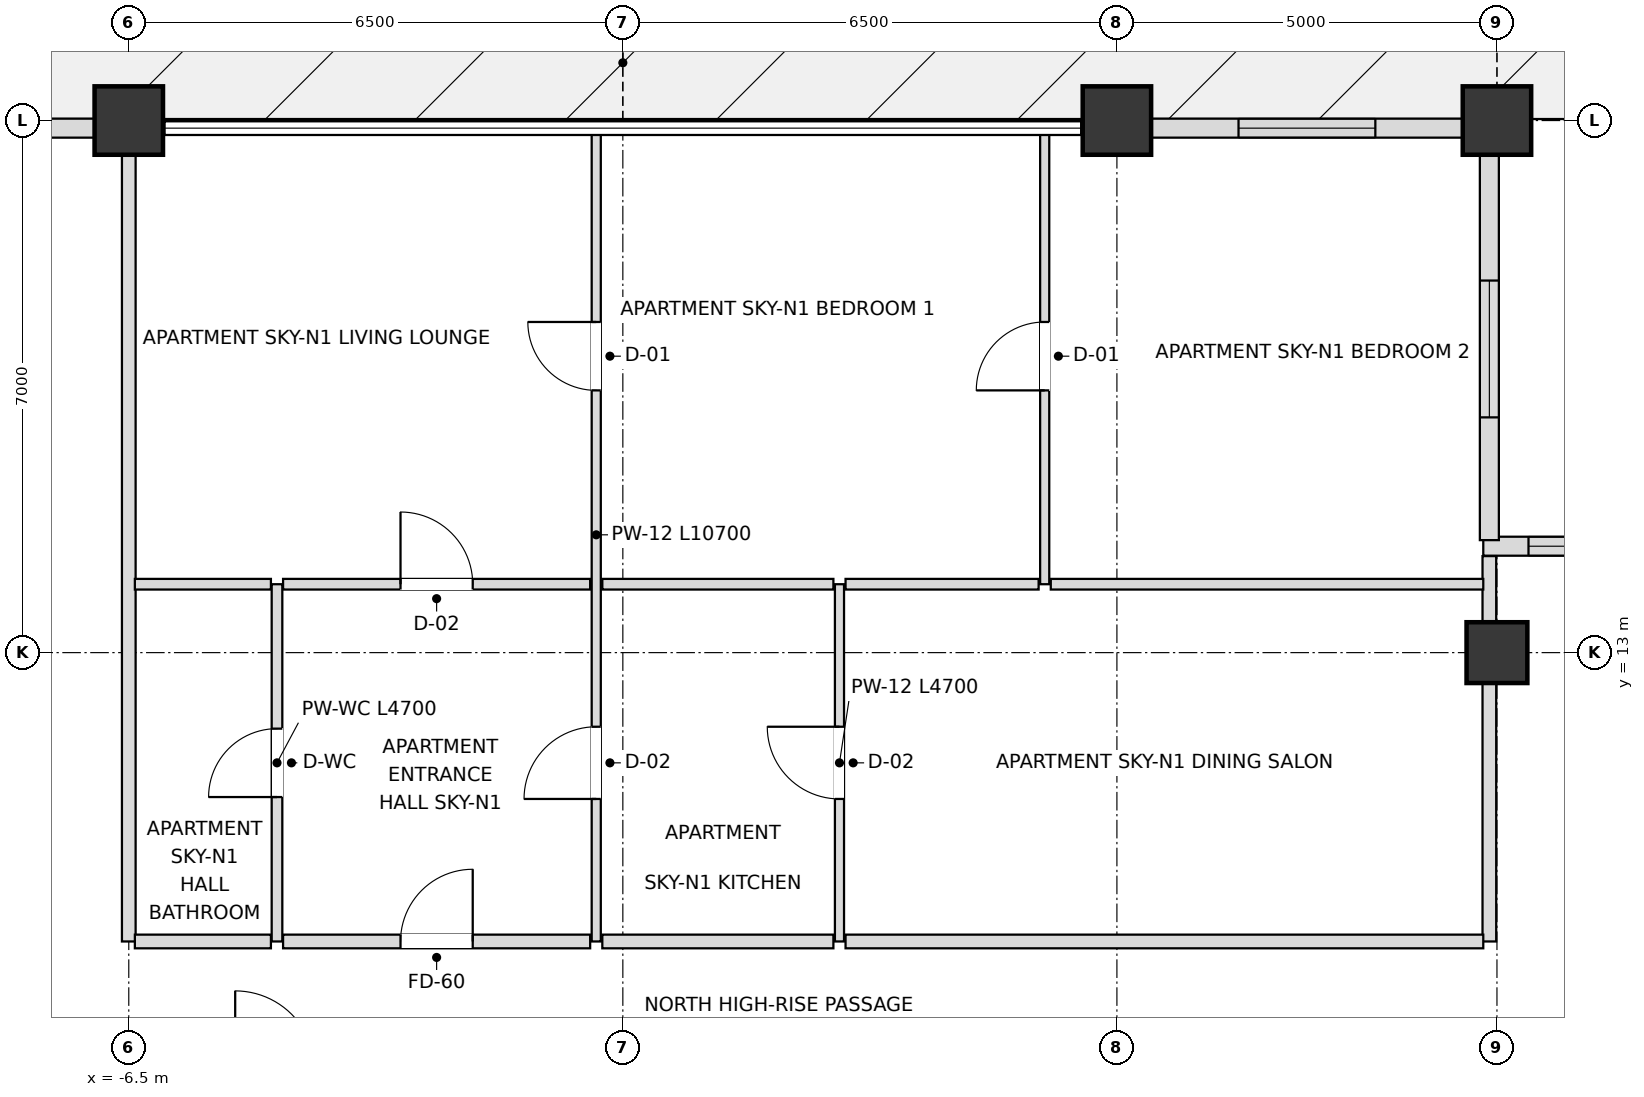
"""IFC4 building model, lengths in metres.
Left out: names, types, materials, properties, quantities, classifications, styles, units other than length and angle.
Written with IfcOpenShell. Run it as: python <this file> out.ifc"""

import sys

from ifc_helpers import new_model, si_unit, direction, frame, frame_2d, origin, origin_2d, place, context, subcontext, project, spatial, rectangle, extrude, element, fill, save


model = new_model("IFC4")
c1 = context("Model", 3, precision=1e-05, world=origin(), true_north=direction((0.0, 1.0)))
c2 = subcontext(c1, "Body", "Model", "MODEL_VIEW")
j1 = project(units=[si_unit("LENGTHUNIT", "METRE"), si_unit("PLANEANGLEUNIT", "RADIAN")], contexts=[c1])
p1 = place(None, origin())
s1 = spatial("IfcSite", under=j1, at=p1, CompositionType="ELEMENT")
p2 = place(p1, origin())
s2 = spatial("IfcBuilding", under=s1, at=p2, CompositionType="ELEMENT")
p3 = place(p2, frame((0.0, 0.0, 217.8)))
s3 = spatial("IfcBuildingStorey", under=s2, at=p3, CompositionType="ELEMENT", Elevation=217.8)
for number, where, z_axis, x_axis in (
    (1, (11.5, 20.0, 0.0), (0.0, 0.0, 1.0), (1.0, 0.0, 0.0)),
    (2, (6.5, 20.0, 0.0), (0.0, 0.0, 1.0), (1.0, 0.0, 0.0)),
    (3, (-6.5, 20.0, 0.0), (0.0, 0.0, 1.0), (1.0, 0.0, 0.0)),
):
    element("IfcColumn", number, at=place(p3, frame(where, z_axis=z_axis, x_axis=x_axis)), inside=s3, PredefinedType="USERDEFINED", context=c2, shape_type="SweptSolid", body=[
        extrude(rectangle(XDim=0.9, YDim=0.9, at=origin_2d()), origin(), (0.0, 0.0, 1.0), 4.5),
    ])
p4 = place(p3, frame((11.5, 13.0, 0.0), z_axis=(0.0, 0.0, 1.0), x_axis=(1.0, 0.0, 0.0)))
e4 = element("IfcColumn", 4, at=p4, inside=s3, PredefinedType="COLUMN", context=c2, shape_type="SweptSolid", body=[
    extrude(rectangle(XDim=0.8, YDim=0.8, at=origin_2d()), origin(), (0.0, 0.0, 1.0), 4.5),
])
p5 = place(p3, frame((11.055, 19.9, 0.0), z_axis=(0.0, 0.0, 1.0), x_axis=(-1.0, 0.0, 0.0)))
e5 = element("IfcWall", 5, at=p5, inside=s3, PredefinedType="SOLIDWALL", context=c2, shape_type="SweptSolid", body=[
    extrude(rectangle(XDim=4.11, YDim=0.25, at=frame_2d((2.055, 0.0))), origin(), (0.0, 0.0, 1.0), 3.648),
])
p6 = place(p5, frame((1.155, 0.0, 0.72)))
e6 = element("IfcOpeningElement", 6, at=p6, cuts=e5, PredefinedType="OPENING", context=c2, shape_type="SweptSolid", body=[
    extrude(rectangle(XDim=1.8, YDim=1.68, at=frame_2d((0.9, 0.84))), frame((0.0, 0.135, 0.0), z_axis=(0.0, -1.0, 0.0), x_axis=(1.0, 0.0, 0.0)), (0.0, 0.0, 1.0), 0.27),
])
p7 = place(p3, frame((-6.945, 19.9, 0.0), z_axis=(0.0, 0.0, 1.0), x_axis=(-1.0, 0.0, 0.0)))
e7 = element("IfcWall", 7, at=p7, inside=s3, PredefinedType="SOLIDWALL", context=c2, shape_type="SweptSolid", body=[
    extrude(rectangle(XDim=4.11, YDim=0.25, at=frame_2d((2.055, 0.0))), origin(), (0.0, 0.0, 1.0), 3.648),
])
p8 = place(p7, frame((1.155, 0.0, 0.72)))
e8 = element("IfcOpeningElement", 8, at=p8, cuts=e7, PredefinedType="OPENING", context=c2, shape_type="SweptSolid", body=[
    extrude(rectangle(XDim=1.8, YDim=1.68, at=frame_2d((0.9, 0.84))), frame((0.0, 0.135, 0.0), z_axis=(0.0, -1.0, 0.0), x_axis=(1.0, 0.0, 0.0)), (0.0, 0.0, 1.0), 0.27),
])
p9 = place(p3, frame((16.98, 14.4, 0.0), z_axis=(0.0, 0.0, 1.0), x_axis=(-1.0, 0.0, 0.0)))
e9 = element("IfcWall", 9, at=p9, inside=s3, PredefinedType="SOLIDWALL", context=c2, shape_type="SweptSolid", body=[
    extrude(rectangle(XDim=5.66, YDim=0.25, at=frame_2d((2.83, 0.0))), origin(), (0.0, 0.0, 1.0), 3.648),
])
p10 = place(p9, frame((0.595, 0.0, 0.72)))
e10 = element("IfcOpeningElement", 10, at=p10, cuts=e9, PredefinedType="OPENING", context=c2, shape_type="SweptSolid", body=[
    extrude(rectangle(XDim=1.8, YDim=1.68, at=frame_2d((0.9, 0.84))), frame((0.0, 0.135, 0.0), z_axis=(0.0, -1.0, 0.0), x_axis=(1.0, 0.0, 0.0)), (0.0, 0.0, 1.0), 0.27),
])
p11 = place(p9, frame((3.265, 0.0, 0.72)))
e11 = element("IfcOpeningElement", 11, at=p11, cuts=e9, PredefinedType="OPENING", context=c2, shape_type="SweptSolid", body=[
    extrude(rectangle(XDim=1.8, YDim=1.68, at=frame_2d((0.9, 0.84))), frame((0.0, 0.135, 0.0), z_axis=(0.0, -1.0, 0.0), x_axis=(1.0, 0.0, 0.0)), (0.0, 0.0, 1.0), 0.27),
])
p12 = place(p3, frame((11.4, 14.48, 0.0), z_axis=(0.0, 0.0, 1.0), x_axis=(0.0, 1.0, 0.0)))
e12 = element("IfcWall", 12, at=p12, inside=s3, PredefinedType="SOLIDWALL", context=c2, shape_type="SweptSolid", body=[
    extrude(rectangle(XDim=5.34, YDim=0.25, at=frame_2d((2.67, 0.0))), origin(), (0.0, 0.0, 1.0), 3.648),
])
p13 = place(p12, frame((1.615, 0.0, 0.72)))
e13 = element("IfcOpeningElement", 13, at=p13, cuts=e12, PredefinedType="OPENING", context=c2, shape_type="SweptSolid", body=[
    extrude(rectangle(XDim=1.8, YDim=1.68, at=frame_2d((0.9, 0.84))), frame((0.0, 0.135, 0.0), z_axis=(0.0, -1.0, 0.0), x_axis=(1.0, 0.0, 0.0)), (0.0, 0.0, 1.0), 0.27),
])
p14 = place(p3, frame((-6.5, 9.2, 0.0), z_axis=(0.0, 0.0, 1.0), x_axis=(0.0, 1.0, 0.0)))
e14 = element("IfcWall", 14, at=p14, inside=s3, PredefinedType="PARTITIONING", context=c2, shape_type="SweptSolid", body=[
    extrude(rectangle(XDim=10.7, YDim=0.18, at=frame_2d((5.35, 0.0))), origin(), (0.0, 0.0, 1.0), 3.726),
])
p15 = place(p3, frame((-4.55, 9.2, 0.0), z_axis=(0.0, 0.0, 1.0), x_axis=(0.0, 1.0, 0.0)))
e15 = element("IfcWall", 15, at=p15, inside=s3, PredefinedType="PARTITIONING", context=c2, shape_type="SweptSolid", body=[
    extrude(rectangle(XDim=4.7, YDim=0.14, at=frame_2d((2.35, 0.0))), origin(), (0.0, 0.0, 1.0), 4.28),
])
p16 = place(p15, frame((1.9, 0.0, 0.0)))
e16 = element("IfcOpeningElement", 16, at=p16, cuts=e15, PredefinedType="OPENING", context=c2, shape_type="SweptSolid", body=[
    extrude(rectangle(XDim=0.9, YDim=2.1, at=frame_2d((0.45, 1.05))), frame((0.0, 0.08, 0.0), z_axis=(0.0, -1.0, 0.0), x_axis=(1.0, 0.0, 0.0)), (0.0, 0.0, 1.0), 0.16),
])
p17 = place(p3, frame((-0.35, 9.2, 0.0), z_axis=(0.0, 0.0, 1.0), x_axis=(0.0, 1.0, 0.0)))
e17 = element("IfcWall", 17, at=p17, inside=s3, PredefinedType="PARTITIONING", context=c2, shape_type="SweptSolid", body=[
    extrude(rectangle(XDim=10.7, YDim=0.12, at=frame_2d((5.35, 0.0))), origin(), (0.0, 0.0, 1.0), 3.918),
])
p18 = place(p17, frame((1.875, 0.0, 0.0)))
e18 = element("IfcOpeningElement", 18, at=p18, cuts=e17, PredefinedType="OPENING", context=c2, shape_type="SweptSolid", body=[
    extrude(rectangle(XDim=0.95, YDim=2.1, at=frame_2d((0.475, 1.05))), frame((0.0, 0.07, 0.0), z_axis=(0.0, -1.0, 0.0), x_axis=(1.0, 0.0, 0.0)), (0.0, 0.0, 1.0), 0.14),
])
p19 = place(p17, frame((7.25, 0.0, 0.0)))
e19 = element("IfcOpeningElement", 19, at=p19, cuts=e17, PredefinedType="OPENING", context=c2, shape_type="SweptSolid", body=[
    extrude(rectangle(XDim=0.9, YDim=2.1, at=frame_2d((0.45, 1.05))), frame((0.0, 0.07, 0.0), z_axis=(0.0, -1.0, 0.0), x_axis=(1.0, 0.0, 0.0)), (0.0, 0.0, 1.0), 0.14),
])
p20 = place(p3, frame((2.85, 9.2, 0.0), z_axis=(0.0, 0.0, 1.0), x_axis=(0.0, 1.0, 0.0)))
e20 = element("IfcWall", 20, at=p20, inside=s3, PredefinedType="PARTITIONING", context=c2, shape_type="SweptSolid", body=[
    extrude(rectangle(XDim=4.7, YDim=0.12, at=frame_2d((2.35, 0.0))), origin(), (0.0, 0.0, 1.0), 4.28),
])
p21 = place(p20, frame((1.875, 0.0, 0.0)))
e21 = element("IfcOpeningElement", 21, at=p21, cuts=e20, PredefinedType="OPENING", context=c2, shape_type="SweptSolid", body=[
    extrude(rectangle(XDim=0.95, YDim=2.1, at=frame_2d((0.475, 1.05))), frame((0.0, 0.07, 0.0), z_axis=(0.0, -1.0, 0.0), x_axis=(1.0, 0.0, 0.0)), (0.0, 0.0, 1.0), 0.14),
])
p22 = place(p3, frame((5.55, 13.9, 0.0), z_axis=(0.0, 0.0, 1.0), x_axis=(0.0, 1.0, 0.0)))
e22 = element("IfcWall", 22, at=p22, inside=s3, PredefinedType="PARTITIONING", context=c2, shape_type="SweptSolid", body=[
    extrude(rectangle(XDim=6.0, YDim=0.12, at=frame_2d((3.0, 0.0))), origin(), (0.0, 0.0, 1.0), 3.918),
])
p23 = place(p22, frame((2.55, 0.0, 0.0)))
e23 = element("IfcOpeningElement", 23, at=p23, cuts=e22, PredefinedType="OPENING", context=c2, shape_type="SweptSolid", body=[
    extrude(rectangle(XDim=0.9, YDim=2.1, at=frame_2d((0.45, 1.05))), frame((0.0, 0.07, 0.0), z_axis=(0.0, -1.0, 0.0), x_axis=(1.0, 0.0, 0.0)), (0.0, 0.0, 1.0), 0.14),
])
p24 = place(p3, frame((11.4, 9.2, 0.0), z_axis=(0.0, 0.0, 1.0), x_axis=(0.0, 1.0, 0.0)))
e24 = element("IfcWall", 24, at=p24, inside=s3, PredefinedType="PARTITIONING", context=c2, shape_type="SweptSolid", body=[
    extrude(rectangle(XDim=5.07, YDim=0.18, at=frame_2d((2.535, 0.0))), origin(), (0.0, 0.0, 1.0), 3.648),
])
p25 = place(p3, frame((-6.42, 9.2, 0.0), z_axis=(0.0, 0.0, 1.0), x_axis=(1.0, 0.0, 0.0)))
e25 = element("IfcWall", 25, at=p25, inside=s3, PredefinedType="PARTITIONING", context=c2, shape_type="SweptSolid", body=[
    extrude(rectangle(XDim=1.79, YDim=0.18, at=frame_2d((0.895, 0.0))), origin(), (0.0, 0.0, 1.0), 4.28),
])
p26 = place(p3, frame((-4.47, 9.2, 0.0), z_axis=(0.0, 0.0, 1.0), x_axis=(1.0, 0.0, 0.0)))
e26 = element("IfcWall", 26, at=p26, inside=s3, PredefinedType="PARTITIONING", context=c2, shape_type="SweptSolid", body=[
    extrude(rectangle(XDim=4.04, YDim=0.18, at=frame_2d((2.02, 0.0))), origin(), (0.0, 0.0, 1.0), 4.28),
])
p27 = place(p26, frame((1.545, 0.0, 0.0)))
e27 = element("IfcOpeningElement", 27, at=p27, cuts=e26, PredefinedType="OPENING", context=c2, shape_type="SweptSolid", body=[
    extrude(rectangle(XDim=0.95, YDim=2.15, at=frame_2d((0.475, 1.075))), frame((0.0, 0.1, 0.0), z_axis=(0.0, -1.0, 0.0), x_axis=(1.0, 0.0, 0.0)), (0.0, 0.0, 1.0), 0.2),
])
p28 = place(p3, frame((-0.27, 9.2, 0.0), z_axis=(0.0, 0.0, 1.0), x_axis=(1.0, 0.0, 0.0)))
e28 = element("IfcWall", 28, at=p28, inside=s3, PredefinedType="PARTITIONING", context=c2, shape_type="SweptSolid", body=[
    extrude(rectangle(XDim=3.04, YDim=0.18, at=frame_2d((1.52, 0.0))), origin(), (0.0, 0.0, 1.0), 4.28),
])
p29 = place(p3, frame((2.93, 9.2, 0.0), z_axis=(0.0, 0.0, 1.0), x_axis=(1.0, 0.0, 0.0)))
e29 = element("IfcWall", 29, at=p29, inside=s3, PredefinedType="PARTITIONING", context=c2, shape_type="SweptSolid", body=[
    extrude(rectangle(XDim=8.39, YDim=0.18, at=frame_2d((4.195, 0.0))), origin(), (0.0, 0.0, 1.0), 3.726),
])
p30 = place(p3, frame((-6.42, 13.9, 0.0), z_axis=(0.0, 0.0, 1.0), x_axis=(1.0, 0.0, 0.0)))
e30 = element("IfcWall", 30, at=p30, inside=s3, PredefinedType="PARTITIONING", context=c2, shape_type="SweptSolid", body=[
    extrude(rectangle(XDim=1.79, YDim=0.14, at=frame_2d((0.895, 0.0))), origin(), (0.0, 0.0, 1.0), 4.28),
])
p31 = place(p3, frame((-4.47, 13.9, 0.0), z_axis=(0.0, 0.0, 1.0), x_axis=(1.0, 0.0, 0.0)))
e31 = element("IfcWall", 31, at=p31, inside=s3, PredefinedType="PARTITIONING", context=c2, shape_type="SweptSolid", body=[
    extrude(rectangle(XDim=4.04, YDim=0.14, at=frame_2d((2.02, 0.0))), origin(), (0.0, 0.0, 1.0), 4.28),
])
p32 = place(p31, frame((1.545, 0.0, 0.0)))
e32 = element("IfcOpeningElement", 32, at=p32, cuts=e31, PredefinedType="OPENING", context=c2, shape_type="SweptSolid", body=[
    extrude(rectangle(XDim=0.95, YDim=2.1, at=frame_2d((0.475, 1.05))), frame((0.0, 0.08, 0.0), z_axis=(0.0, -1.0, 0.0), x_axis=(1.0, 0.0, 0.0)), (0.0, 0.0, 1.0), 0.16),
])
p33 = place(p3, frame((-0.27, 13.9, 0.0), z_axis=(0.0, 0.0, 1.0), x_axis=(1.0, 0.0, 0.0)))
e33 = element("IfcWall", 33, at=p33, inside=s3, PredefinedType="PARTITIONING", context=c2, shape_type="SweptSolid", body=[
    extrude(rectangle(XDim=3.04, YDim=0.14, at=frame_2d((1.52, 0.0))), origin(), (0.0, 0.0, 1.0), 4.28),
])
p34 = place(p3, frame((2.93, 13.9, 0.0), z_axis=(0.0, 0.0, 1.0), x_axis=(1.0, 0.0, 0.0)))
e34 = element("IfcWall", 34, at=p34, inside=s3, PredefinedType="PARTITIONING", context=c2, shape_type="SweptSolid", body=[
    extrude(rectangle(XDim=2.54, YDim=0.14, at=frame_2d((1.27, 0.0))), origin(), (0.0, 0.0, 1.0), 4.28),
])
p35 = place(p3, frame((5.63, 13.9, 0.0), z_axis=(0.0, 0.0, 1.0), x_axis=(1.0, 0.0, 0.0)))
e35 = element("IfcWall", 35, at=p35, inside=s3, PredefinedType="PARTITIONING", context=c2, shape_type="SweptSolid", body=[
    extrude(rectangle(XDim=5.69, YDim=0.14, at=frame_2d((2.845, 0.0))), origin(), (0.0, 0.0, 1.0), 3.726),
])
p36 = place(p6, origin())
e36 = element("IfcWindow", 36, at=p36, inside=s3, PartitioningType="SINGLE_PANEL", PredefinedType="WINDOW", context=c2, shape_type="SweptSolid", body=[
    extrude(rectangle(XDim=1.8, YDim=1.68, at=frame_2d((0.9, 0.84))), frame((0.0, 0.03, 0.0), z_axis=(0.0, -1.0, 0.0), x_axis=(1.0, 0.0, 0.0)), (0.0, 0.0, 1.0), 0.06),
])
fill(e6, e36)
p37 = place(p11, origin())
e37 = element("IfcWindow", 37, at=p37, inside=s3, PartitioningType="SINGLE_PANEL", PredefinedType="WINDOW", context=c2, shape_type="SweptSolid", body=[
    extrude(rectangle(XDim=1.8, YDim=1.68, at=frame_2d((0.9, 0.84))), frame((0.0, 0.03, 0.0), z_axis=(0.0, -1.0, 0.0), x_axis=(1.0, 0.0, 0.0)), (0.0, 0.0, 1.0), 0.06),
])
fill(e11, e37)
p38 = place(p13, origin())
e38 = element("IfcWindow", 38, at=p38, inside=s3, PartitioningType="SINGLE_PANEL", PredefinedType="WINDOW", context=c2, shape_type="SweptSolid", body=[
    extrude(rectangle(XDim=1.8, YDim=1.68, at=frame_2d((0.9, 0.84))), frame((0.0, 0.03, 0.0), z_axis=(0.0, -1.0, 0.0), x_axis=(1.0, 0.0, 0.0)), (0.0, 0.0, 1.0), 0.06),
])
fill(e13, e38)
p39 = place(p16, origin())
e39 = element("IfcDoor", 39, at=p39, inside=s3, OperationType="SINGLE_SWING_LEFT", PredefinedType="DOOR", context=c2, shape_type="SweptSolid", body=[
    extrude(rectangle(XDim=0.9, YDim=2.1, at=frame_2d((0.45, 1.05))), frame((0.0, 0.025, 0.0), z_axis=(0.0, -1.0, 0.0), x_axis=(1.0, 0.0, 0.0)), (0.0, 0.0, 1.0), 0.05),
])
fill(e16, e39)
p40 = place(p27, origin())
e40 = element("IfcDoor", 40, at=p40, inside=s3, OperationType="SINGLE_SWING_RIGHT", PredefinedType="DOOR", context=c2, shape_type="SweptSolid", body=[
    extrude(rectangle(XDim=0.95, YDim=2.15, at=frame_2d((0.475, 1.075))), frame((0.0, 0.025, 0.0), z_axis=(0.0, -1.0, 0.0), x_axis=(1.0, 0.0, 0.0)), (0.0, 0.0, 1.0), 0.05),
])
fill(e27, e40)
p41 = place(p18, origin())
e41 = element("IfcDoor", 41, at=p41, inside=s3, OperationType="SINGLE_SWING_LEFT", PredefinedType="DOOR", context=c2, shape_type="SweptSolid", body=[
    extrude(rectangle(XDim=0.95, YDim=2.1, at=frame_2d((0.475, 1.05))), frame((0.0, 0.025, 0.0), z_axis=(0.0, -1.0, 0.0), x_axis=(1.0, 0.0, 0.0)), (0.0, 0.0, 1.0), 0.05),
])
fill(e18, e41)
p42 = place(p21, origin())
e42 = element("IfcDoor", 42, at=p42, inside=s3, OperationType="SINGLE_SWING_RIGHT", PredefinedType="DOOR", context=c2, shape_type="SweptSolid", body=[
    extrude(rectangle(XDim=0.95, YDim=2.1, at=frame_2d((0.475, 1.05))), frame((0.0, 0.025, 0.0), z_axis=(0.0, -1.0, 0.0), x_axis=(1.0, 0.0, 0.0)), (0.0, 0.0, 1.0), 0.05),
])
fill(e21, e42)
p43 = place(p32, origin())
e43 = element("IfcDoor", 43, at=p43, inside=s3, OperationType="SINGLE_SWING_LEFT", PredefinedType="DOOR", context=c2, shape_type="SweptSolid", body=[
    extrude(rectangle(XDim=0.95, YDim=2.1, at=frame_2d((0.475, 1.05))), frame((0.0, 0.025, 0.0), z_axis=(0.0, -1.0, 0.0), x_axis=(1.0, 0.0, 0.0)), (0.0, 0.0, 1.0), 0.05),
])
fill(e32, e43)
p44 = place(p19, origin())
e44 = element("IfcDoor", 44, at=p44, inside=s3, OperationType="SINGLE_SWING_RIGHT", PredefinedType="DOOR", context=c2, shape_type="SweptSolid", body=[
    extrude(rectangle(XDim=0.9, YDim=2.1, at=frame_2d((0.45, 1.05))), frame((0.0, 0.025, 0.0), z_axis=(0.0, -1.0, 0.0), x_axis=(1.0, 0.0, 0.0)), (0.0, 0.0, 1.0), 0.05),
])
fill(e19, e44)
p45 = place(p23, origin())
e45 = element("IfcDoor", 45, at=p45, inside=s3, OperationType="SINGLE_SWING_LEFT", PredefinedType="DOOR", context=c2, shape_type="SweptSolid", body=[
    extrude(rectangle(XDim=0.9, YDim=2.1, at=frame_2d((0.45, 1.05))), frame((0.0, 0.025, 0.0), z_axis=(0.0, -1.0, 0.0), x_axis=(1.0, 0.0, 0.0)), (0.0, 0.0, 1.0), 0.05),
])
fill(e23, e45)
save(model, sys.argv[1])
